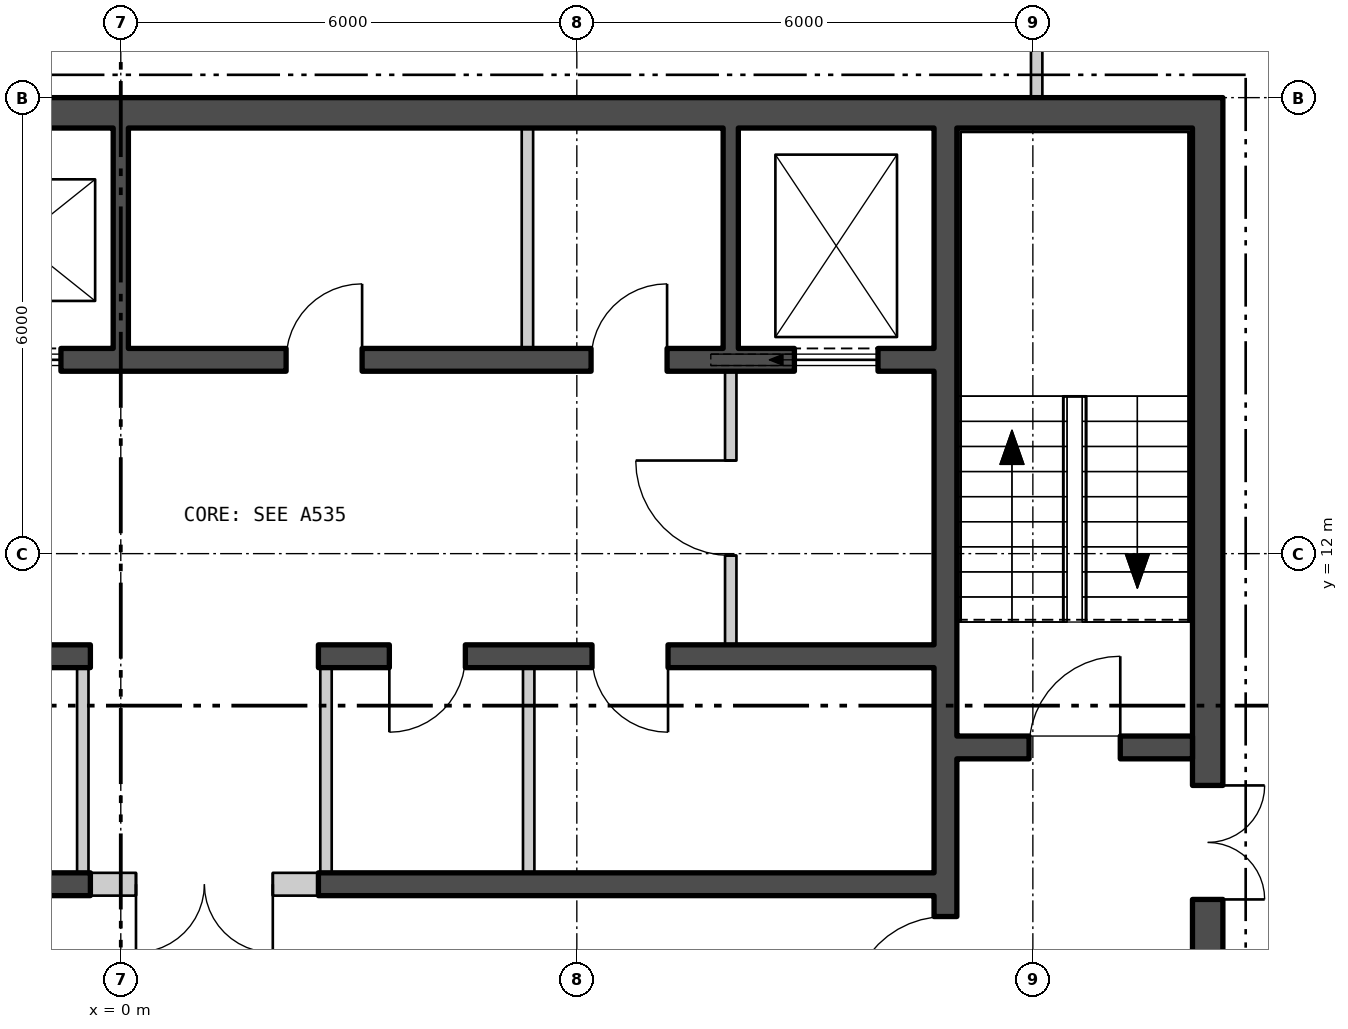
"""IFC4 building model, lengths in metres.
Left out: names, types, materials, properties, quantities, classifications, styles, units other than length and angle.
Written with IfcOpenShell. Run it as: python <this file> out.ifc"""

import sys

from ifc_helpers import new_model, si_unit, direction, frame, frame_2d, origin, place, context, subcontext, project, spatial, polyline, rectangle, outline, extrude, element, fill, save


model = new_model("IFC4")
c1 = context("Model", 3, precision=1e-05, world=origin(), true_north=direction((0.0, 1.0)))
c2 = subcontext(c1, "Body", "Model", "MODEL_VIEW")
j1 = project(units=[si_unit("LENGTHUNIT", "METRE"), si_unit("PLANEANGLEUNIT", "RADIAN")], contexts=[c1])
p1 = place(None, origin())
s1 = spatial("IfcSite", under=j1, at=p1, CompositionType="ELEMENT")
p2 = place(p1, origin())
s2 = spatial("IfcBuilding", under=s1, at=p2, CompositionType="ELEMENT")
p3 = place(p2, frame((0.0, 0.0, 298.2)))
s3 = spatial("IfcBuildingStorey", under=s2, at=p3, CompositionType="ELEMENT", Elevation=298.2)
p4 = place(p3, frame((2.335, -23.682, -0.28), z_axis=(0.0, 0.0, 1.0), x_axis=(0.499999764979, 0.866025539474, 0.0)))
e1 = element("IfcWall", 1, at=p4, inside=s3, PredefinedType="SOLIDWALL", context=c2, shape_type="SweptSolid", body=[
    extrude(outline(polyline([(-0.13, -0.225), (45.87, -0.225), (45.61, 0.225), (0.13, 0.225), (-0.13, -0.225)])), origin(), (0.0, 0.0, 1.0), 6.1),
])
p5 = place(p4, frame((1.424, 0.0, 1.18)))
e2 = element("IfcOpeningElement", 2, at=p5, cuts=e1, PredefinedType="OPENING", context=c2, shape_type="SweptSolid", body=[
    extrude(rectangle(XDim=2.4, YDim=4.1, at=frame_2d((1.2, 2.05))), frame((0.0, 0.235, 0.0), z_axis=(0.0, -1.0, 0.0), x_axis=(1.0, 0.0, 0.0)), (0.0, 0.0, 1.0), 0.47),
])
p6 = place(p4, frame((5.893, 0.0, 1.18)))
e3 = element("IfcOpeningElement", 3, at=p6, cuts=e1, PredefinedType="OPENING", context=c2, shape_type="SweptSolid", body=[
    extrude(rectangle(XDim=2.4, YDim=4.1, at=frame_2d((1.2, 2.05))), frame((0.0, 0.235, 0.0), z_axis=(0.0, -1.0, 0.0), x_axis=(1.0, 0.0, 0.0)), (0.0, 0.0, 1.0), 0.47),
])
p7 = place(p4, frame((10.401, 0.0, 1.18)))
e4 = element("IfcOpeningElement", 4, at=p7, cuts=e1, PredefinedType="OPENING", context=c2, shape_type="SweptSolid", body=[
    extrude(rectangle(XDim=2.4, YDim=4.1, at=frame_2d((1.2, 2.05))), frame((0.0, 0.235, 0.0), z_axis=(0.0, -1.0, 0.0), x_axis=(1.0, 0.0, 0.0)), (0.0, 0.0, 1.0), 0.47),
])
p8 = place(p4, frame((14.909, 0.0, 1.18)))
e5 = element("IfcOpeningElement", 5, at=p8, cuts=e1, PredefinedType="OPENING", context=c2, shape_type="SweptSolid", body=[
    extrude(rectangle(XDim=2.4, YDim=4.1, at=frame_2d((1.2, 2.05))), frame((0.0, 0.235, 0.0), z_axis=(0.0, -1.0, 0.0), x_axis=(1.0, 0.0, 0.0)), (0.0, 0.0, 1.0), 0.47),
])
p9 = place(p4, frame((19.716, 0.0, 0.28)))
e6 = element("IfcOpeningElement", 6, at=p9, cuts=e1, PredefinedType="OPENING", context=c2, shape_type="SweptSolid", body=[
    extrude(rectangle(XDim=1.8, YDim=2.4, at=frame_2d((0.9, 1.2))), frame((0.0, 0.235, 0.0), z_axis=(0.0, -1.0, 0.0), x_axis=(1.0, 0.0, 0.0)), (0.0, 0.0, 1.0), 0.47),
])
p10 = place(p4, frame((24.224, 0.0, 0.28)))
e7 = element("IfcOpeningElement", 7, at=p10, cuts=e1, PredefinedType="OPENING", context=c2, shape_type="SweptSolid", body=[
    extrude(rectangle(XDim=1.8, YDim=2.4, at=frame_2d((0.9, 1.2))), frame((0.0, 0.235, 0.0), z_axis=(0.0, -1.0, 0.0), x_axis=(1.0, 0.0, 0.0)), (0.0, 0.0, 1.0), 0.47),
])
p11 = place(p4, frame((28.431, 0.0, 1.18)))
e8 = element("IfcOpeningElement", 8, at=p11, cuts=e1, PredefinedType="OPENING", context=c2, shape_type="SweptSolid", body=[
    extrude(rectangle(XDim=2.4, YDim=4.1, at=frame_2d((1.2, 2.05))), frame((0.0, 0.235, 0.0), z_axis=(0.0, -1.0, 0.0), x_axis=(1.0, 0.0, 0.0)), (0.0, 0.0, 1.0), 0.47),
])
p12 = place(p4, frame((32.939, 0.0, 1.18)))
e9 = element("IfcOpeningElement", 9, at=p12, cuts=e1, PredefinedType="OPENING", context=c2, shape_type="SweptSolid", body=[
    extrude(rectangle(XDim=2.4, YDim=4.1, at=frame_2d((1.2, 2.05))), frame((0.0, 0.235, 0.0), z_axis=(0.0, -1.0, 0.0), x_axis=(1.0, 0.0, 0.0)), (0.0, 0.0, 1.0), 0.47),
])
p13 = place(p4, frame((37.447, 0.0, 1.18)))
e10 = element("IfcOpeningElement", 10, at=p13, cuts=e1, PredefinedType="OPENING", context=c2, shape_type="SweptSolid", body=[
    extrude(rectangle(XDim=2.4, YDim=4.1, at=frame_2d((1.2, 2.05))), frame((0.0, 0.235, 0.0), z_axis=(0.0, -1.0, 0.0), x_axis=(1.0, 0.0, 0.0)), (0.0, 0.0, 1.0), 0.47),
])
p14 = place(p4, frame((41.916, 0.0, 1.18)))
e11 = element("IfcOpeningElement", 11, at=p14, cuts=e1, PredefinedType="OPENING", context=c2, shape_type="SweptSolid", body=[
    extrude(rectangle(XDim=2.4, YDim=4.1, at=frame_2d((1.2, 2.05))), frame((0.0, 0.235, 0.0), z_axis=(0.0, -1.0, 0.0), x_axis=(1.0, 0.0, 0.0)), (0.0, 0.0, 1.0), 0.47),
])
p15 = place(p3, frame((-14.5, 17.8, 0.0), z_axis=(0.0, 0.0, 1.0), x_axis=(1.0, 0.0, 0.0)))
e12 = element("IfcWall", 12, at=p15, inside=s3, PredefinedType="SHEAR", context=c2, shape_type="SweptSolid", body=[
    extrude(rectangle(XDim=29.0, YDim=0.4, at=frame_2d((14.5, 0.0))), origin(), (0.0, 0.0, 1.0), 5.8),
])
p16 = place(p3, frame((14.3, 4.4, 0.0), z_axis=(0.0, 0.0, 1.0), x_axis=(0.0, 1.0, 0.0)))
e13 = element("IfcWall", 13, at=p16, inside=s3, PredefinedType="SHEAR", context=c2, shape_type="SweptSolid", body=[
    extrude(rectangle(XDim=13.2, YDim=0.4, at=frame_2d((6.6, 0.0))), origin(), (0.0, 0.0, 1.0), 5.8),
])
p17 = place(p16, frame((3.05, 0.0, 0.0)))
e14 = element("IfcOpeningElement", 14, at=p17, cuts=e13, PredefinedType="OPENING", context=c2, shape_type="SweptSolid", body=[
    extrude(rectangle(XDim=1.5, YDim=2.1, at=frame_2d((0.75, 1.05))), frame((0.0, 0.21, 0.0), z_axis=(0.0, -1.0, 0.0), x_axis=(1.0, 0.0, 0.0)), (0.0, 0.0, 1.0), 0.42),
])
p18 = place(p3, frame((10.85, 4.4, 0.0), z_axis=(0.0, 0.0, 1.0), x_axis=(0.0, 1.0, 0.0)))
e15 = element("IfcWall", 15, at=p18, inside=s3, PredefinedType="SHEAR", context=c2, shape_type="SweptSolid", body=[
    extrude(rectangle(XDim=13.2, YDim=0.3, at=frame_2d((6.6, 0.0))), origin(), (0.0, 0.0, 1.0), 5.8),
])
p19 = place(p18, frame((1.575, 0.0, 0.0)))
e16 = element("IfcOpeningElement", 16, at=p19, cuts=e15, PredefinedType="OPENING", context=c2, shape_type="SweptSolid", body=[
    extrude(rectangle(XDim=1.25, YDim=2.1, at=frame_2d((0.625, 1.05))), frame((0.0, 0.16, 0.0), z_axis=(0.0, -1.0, 0.0), x_axis=(1.0, 0.0, 0.0)), (0.0, 0.0, 1.0), 0.32),
])
p20 = place(p18, frame((0.4, 0.0, 0.0)))
e17 = element("IfcOpeningElement", 17, at=p20, cuts=e15, PredefinedType="OPENING", context=c2, shape_type="SweptSolid", body=[
    extrude(rectangle(XDim=0.9, YDim=2.1, at=frame_2d((0.45, 1.05))), frame((0.0, 0.16, 0.0), z_axis=(0.0, -1.0, 0.0), x_axis=(1.0, 0.0, 0.0)), (0.0, 0.0, 1.0), 0.32),
])
p21 = place(p3, frame((11.0, 9.45, 0.0), z_axis=(0.0, 0.0, 1.0), x_axis=(1.0, 0.0, 0.0)))
e18 = element("IfcWall", 18, at=p21, inside=s3, PredefinedType="SHEAR", context=c2, shape_type="SweptSolid", body=[
    extrude(rectangle(XDim=3.1, YDim=0.3, at=frame_2d((1.55, 0.0))), origin(), (0.0, 0.0, 1.0), 5.8),
])
p22 = place(p21, frame((0.95, 0.0, 0.0)))
e19 = element("IfcOpeningElement", 19, at=p22, cuts=e18, PredefinedType="OPENING", context=c2, shape_type="SweptSolid", body=[
    extrude(rectangle(XDim=1.2, YDim=2.1, at=frame_2d((0.6, 1.05))), frame((0.0, 0.16, 0.0), z_axis=(0.0, -1.0, 0.0), x_axis=(1.0, 0.0, 0.0)), (0.0, 0.0, 1.0), 0.32),
])
p23 = place(p3, frame((-10.7, 14.55, 0.0), z_axis=(0.0, 0.0, 1.0), x_axis=(1.0, 0.0, 0.0)))
e20 = element("IfcWall", 20, at=p23, inside=s3, PredefinedType="SHEAR", context=c2, shape_type="SweptSolid", body=[
    extrude(rectangle(XDim=21.4, YDim=0.3, at=frame_2d((10.7, 0.0))), origin(), (0.0, 0.0, 1.0), 5.8),
])
p24 = place(p23, frame((0.738, 0.0, 0.0)))
e21 = element("IfcOpeningElement", 21, at=p24, cuts=e20, PredefinedType="OPENING", context=c2, shape_type="SweptSolid", body=[
    extrude(rectangle(XDim=1.1, YDim=2.1, at=frame_2d((0.55, 1.05))), frame((0.0, 0.16, 0.0), z_axis=(0.0, -1.0, 0.0), x_axis=(1.0, 0.0, 0.0)), (0.0, 0.0, 1.0), 0.32),
])
p25 = place(p23, frame((3.462, 0.0, 0.0)))
e22 = element("IfcOpeningElement", 22, at=p25, cuts=e20, PredefinedType="OPENING", context=c2, shape_type="SweptSolid", body=[
    extrude(rectangle(XDim=1.1, YDim=2.1, at=frame_2d((0.55, 1.05))), frame((0.0, 0.16, 0.0), z_axis=(0.0, -1.0, 0.0), x_axis=(1.0, 0.0, 0.0)), (0.0, 0.0, 1.0), 0.32),
])
p26 = place(p23, frame((6.138, 0.0, 0.0)))
e23 = element("IfcOpeningElement", 23, at=p26, cuts=e20, PredefinedType="OPENING", context=c2, shape_type="SweptSolid", body=[
    extrude(rectangle(XDim=1.1, YDim=2.1, at=frame_2d((0.55, 1.05))), frame((0.0, 0.16, 0.0), z_axis=(0.0, -1.0, 0.0), x_axis=(1.0, 0.0, 0.0)), (0.0, 0.0, 1.0), 0.32),
])
p27 = place(p23, frame((8.812, 0.0, 0.0)))
e24 = element("IfcOpeningElement", 24, at=p27, cuts=e20, PredefinedType="OPENING", context=c2, shape_type="SweptSolid", body=[
    extrude(rectangle(XDim=1.1, YDim=2.1, at=frame_2d((0.55, 1.05))), frame((0.0, 0.16, 0.0), z_axis=(0.0, -1.0, 0.0), x_axis=(1.0, 0.0, 0.0)), (0.0, 0.0, 1.0), 0.32),
])
p28 = place(p23, frame((19.562, 0.0, 0.0)))
e25 = element("IfcOpeningElement", 25, at=p28, cuts=e20, PredefinedType="OPENING", context=c2, shape_type="SweptSolid", body=[
    extrude(rectangle(XDim=1.1, YDim=2.1, at=frame_2d((0.55, 1.05))), frame((0.0, 0.16, 0.0), z_axis=(0.0, -1.0, 0.0), x_axis=(1.0, 0.0, 0.0)), (0.0, 0.0, 1.0), 0.32),
])
p29 = place(p23, frame((12.875, 0.0, 0.0)))
e26 = element("IfcOpeningElement", 26, at=p29, cuts=e20, PredefinedType="OPENING", context=c2, shape_type="SweptSolid", body=[
    extrude(rectangle(XDim=1.0, YDim=2.1, at=frame_2d((0.5, 1.05))), frame((0.0, 0.16, 0.0), z_axis=(0.0, -1.0, 0.0), x_axis=(1.0, 0.0, 0.0)), (0.0, 0.0, 1.0), 0.32),
])
p30 = place(p23, frame((16.887, 0.0, 0.0)))
e27 = element("IfcOpeningElement", 27, at=p30, cuts=e20, PredefinedType="OPENING", context=c2, shape_type="SweptSolid", body=[
    extrude(rectangle(XDim=1.0, YDim=2.1, at=frame_2d((0.5, 1.05))), frame((0.0, 0.16, 0.0), z_axis=(0.0, -1.0, 0.0), x_axis=(1.0, 0.0, 0.0)), (0.0, 0.0, 1.0), 0.32),
])
p31 = place(p3, frame((-10.7, 10.65, 0.0), z_axis=(0.0, 0.0, 1.0), x_axis=(1.0, 0.0, 0.0)))
e28 = element("IfcWall", 28, at=p31, inside=s3, PredefinedType="SHEAR", context=c2, shape_type="SweptSolid", body=[
    extrude(rectangle(XDim=10.3, YDim=0.3, at=frame_2d((5.15, 0.0))), origin(), (0.0, 0.0, 1.0), 5.8),
])
p32 = place(p31, frame((0.675, 0.0, 0.0)))
e29 = element("IfcOpeningElement", 29, at=p32, cuts=e28, PredefinedType="OPENING", context=c2, shape_type="SweptSolid", body=[
    extrude(rectangle(XDim=1.1, YDim=2.1, at=frame_2d((0.55, 1.05))), frame((0.0, 0.16, 0.0), z_axis=(0.0, -1.0, 0.0), x_axis=(1.0, 0.0, 0.0)), (0.0, 0.0, 1.0), 0.32),
])
p33 = place(p31, frame((3.275, 0.0, 0.0)))
e30 = element("IfcOpeningElement", 30, at=p33, cuts=e28, PredefinedType="OPENING", context=c2, shape_type="SweptSolid", body=[
    extrude(rectangle(XDim=1.1, YDim=2.1, at=frame_2d((0.55, 1.05))), frame((0.0, 0.16, 0.0), z_axis=(0.0, -1.0, 0.0), x_axis=(1.0, 0.0, 0.0)), (0.0, 0.0, 1.0), 0.32),
])
p34 = place(p31, frame((5.825, 0.0, 0.0)))
e31 = element("IfcOpeningElement", 31, at=p34, cuts=e28, PredefinedType="OPENING", context=c2, shape_type="SweptSolid", body=[
    extrude(rectangle(XDim=1.1, YDim=2.1, at=frame_2d((0.55, 1.05))), frame((0.0, 0.16, 0.0), z_axis=(0.0, -1.0, 0.0), x_axis=(1.0, 0.0, 0.0)), (0.0, 0.0, 1.0), 0.32),
])
p35 = place(p31, frame((8.425, 0.0, 0.0)))
e32 = element("IfcOpeningElement", 32, at=p35, cuts=e28, PredefinedType="OPENING", context=c2, shape_type="SweptSolid", body=[
    extrude(rectangle(XDim=1.0, YDim=2.1, at=frame_2d((0.5, 1.05))), frame((0.0, 0.16, 0.0), z_axis=(0.0, -1.0, 0.0), x_axis=(1.0, 0.0, 0.0)), (0.0, 0.0, 1.0), 0.32),
])
p36 = place(p3, frame((-10.7, 7.65, 0.0), z_axis=(0.0, 0.0, 1.0), x_axis=(1.0, 0.0, 0.0)))
e33 = element("IfcWall", 33, at=p36, inside=s3, PredefinedType="SHEAR", context=c2, shape_type="SweptSolid", body=[
    extrude(rectangle(XDim=10.3, YDim=0.3, at=frame_2d((5.15, 0.0))), origin(), (0.0, 0.0, 1.0), 5.8),
])
p37 = place(p3, frame((2.6, 10.65, 0.0), z_axis=(0.0, 0.0, 1.0), x_axis=(1.0, 0.0, 0.0)))
e34 = element("IfcWall", 34, at=p37, inside=s3, PredefinedType="SHEAR", context=c2, shape_type="SweptSolid", body=[
    extrude(rectangle(XDim=8.1, YDim=0.3, at=frame_2d((4.05, 0.0))), origin(), (0.0, 0.0, 1.0), 5.8),
])
p38 = place(p37, frame((0.933, 0.0, 0.0)))
e35 = element("IfcOpeningElement", 35, at=p38, cuts=e34, PredefinedType="OPENING", context=c2, shape_type="SweptSolid", body=[
    extrude(rectangle(XDim=1.0, YDim=2.1, at=frame_2d((0.5, 1.05))), frame((0.0, 0.16, 0.0), z_axis=(0.0, -1.0, 0.0), x_axis=(1.0, 0.0, 0.0)), (0.0, 0.0, 1.0), 0.32),
])
p39 = place(p37, frame((3.6, 0.0, 0.0)))
e36 = element("IfcOpeningElement", 36, at=p39, cuts=e34, PredefinedType="OPENING", context=c2, shape_type="SweptSolid", body=[
    extrude(rectangle(XDim=1.0, YDim=2.1, at=frame_2d((0.5, 1.05))), frame((0.0, 0.16, 0.0), z_axis=(0.0, -1.0, 0.0), x_axis=(1.0, 0.0, 0.0)), (0.0, 0.0, 1.0), 0.32),
])
p40 = place(p3, frame((2.6, 7.65, 0.0), z_axis=(0.0, 0.0, 1.0), x_axis=(1.0, 0.0, 0.0)))
e37 = element("IfcWall", 37, at=p40, inside=s3, PredefinedType="SHEAR", context=c2, shape_type="SweptSolid", body=[
    extrude(rectangle(XDim=8.1, YDim=0.3, at=frame_2d((4.05, 0.0))), origin(), (0.0, 0.0, 1.0), 5.8),
])
p41 = place(p3, frame((0.0, 14.7, 0.0), z_axis=(0.0, 0.0, 1.0), x_axis=(0.0, 1.0, 0.0)))
e38 = element("IfcWall", 38, at=p41, inside=s3, PredefinedType="SHEAR", context=c2, shape_type="SweptSolid", body=[
    extrude(rectangle(XDim=2.9, YDim=0.2, at=frame_2d((1.45, 0.0))), origin(), (0.0, 0.0, 1.0), 5.8),
])
p42 = place(p3, frame((5.35, 14.7, 0.0), z_axis=(0.0, 0.0, 1.0), x_axis=(0.0, 1.0, 0.0)))
e39 = element("IfcWall", 39, at=p42, inside=s3, PredefinedType="PARTITIONING", context=c2, shape_type="SweptSolid", body=[
    extrude(rectangle(XDim=2.9, YDim=0.15, at=frame_2d((1.45, 0.0))), origin(), (0.0, 0.0, 1.0), 5.8),
])
p43 = place(p3, frame((8.025, 14.7, 0.0), z_axis=(0.0, 0.0, 1.0), x_axis=(0.0, 1.0, 0.0)))
e40 = element("IfcWall", 40, at=p43, inside=s3, PredefinedType="SHEAR", context=c2, shape_type="SweptSolid", body=[
    extrude(rectangle(XDim=2.9, YDim=0.2, at=frame_2d((1.45, 0.0))), origin(), (0.0, 0.0, 1.0), 5.8),
])
for number, where, z_axis, x_axis in (
    (41, (-0.5, 7.8, 0.0), (0.0, 0.0, 1.0), (0.0, 1.0, 0.0)),
    (42, (2.7, 7.8, 0.0), (0.0, 0.0, 1.0), (0.0, 1.0, 0.0)),
    (43, (5.367, 7.8, 0.0), (0.0, 0.0, 1.0), (0.0, 1.0, 0.0)),
):
    element("IfcWall", number, at=place(p3, frame(where, z_axis=z_axis, x_axis=x_axis)), inside=s3, PredefinedType="PARTITIONING", context=c2, shape_type="SweptSolid", body=[
        extrude(rectangle(XDim=2.7, YDim=0.15, at=frame_2d((1.35, 0.0))), origin(), (0.0, 0.0, 1.0), 5.8),
    ])
p44 = place(p3, frame((8.025, 10.8, 0.0), z_axis=(0.0, 0.0, 1.0), x_axis=(0.0, 1.0, 0.0)))
e44 = element("IfcWall", 44, at=p44, inside=s3, PredefinedType="PARTITIONING", context=c2, shape_type="SweptSolid", body=[
    extrude(rectangle(XDim=3.6, YDim=0.15, at=frame_2d((1.8, 0.0))), origin(), (0.0, 0.0, 1.0), 5.8),
])
p45 = place(p44, frame((1.175, 0.0, 0.0)))
e45 = element("IfcOpeningElement", 45, at=p45, cuts=e44, PredefinedType="OPENING", context=c2, shape_type="SweptSolid", body=[
    extrude(rectangle(XDim=1.25, YDim=2.1, at=frame_2d((0.625, 1.05))), frame((0.0, 0.085, 0.0), z_axis=(0.0, -1.0, 0.0), x_axis=(1.0, 0.0, 0.0)), (0.0, 0.0, 1.0), 0.17),
])
p46 = place(p3, frame((-0.4, 7.65, 0.0), z_axis=(0.0, 0.0, 1.0), x_axis=(1.0, 0.0, 0.0)))
e46 = element("IfcWall", 46, at=p46, inside=s3, PredefinedType="PARTITIONING", context=c2, shape_type="SweptSolid", body=[
    extrude(rectangle(XDim=3.0, YDim=0.3, at=frame_2d((1.5, 0.0))), origin(), (0.0, 0.0, 1.0), 5.8),
])
p47 = place(p46, frame((0.6, 0.0, 0.0)))
e47 = element("IfcOpeningElement", 47, at=p47, cuts=e46, PredefinedType="OPENING", context=c2, shape_type="SweptSolid", body=[
    extrude(rectangle(XDim=1.8, YDim=2.4, at=frame_2d((0.9, 1.2))), frame((0.0, 0.16, 0.0), z_axis=(0.0, -1.0, 0.0), x_axis=(1.0, 0.0, 0.0)), (0.0, 0.0, 1.0), 0.32),
])
p48 = place(p3, frame((12.05, 18.0, 0.0), z_axis=(0.0, 0.0, 1.0), x_axis=(0.0, 1.0, 0.0)))
e48 = element("IfcWall", 48, at=p48, inside=s3, PredefinedType="PARTITIONING", context=c2, shape_type="SweptSolid", body=[
    extrude(rectangle(XDim=1.75, YDim=0.15, at=frame_2d((0.875, 0.0))), origin(), (0.0, 0.0, 1.0), 5.8),
])
p49 = place(p27, origin())
e49 = element("IfcDoor", 49, at=p49, inside=s3, OperationType="SLIDING_TO_LEFT", PredefinedType="DOOR", context=c2, shape_type="SweptSolid", body=[
    extrude(rectangle(XDim=1.1, YDim=2.1, at=frame_2d((0.55, 1.05))), frame((0.0, 0.025, 0.0), z_axis=(0.0, -1.0, 0.0), x_axis=(1.0, 0.0, 0.0)), (0.0, 0.0, 1.0), 0.05),
])
fill(e24, e49)
p50 = place(p28, origin())
e50 = element("IfcDoor", 50, at=p50, inside=s3, OperationType="SLIDING_TO_LEFT", PredefinedType="DOOR", context=c2, shape_type="SweptSolid", body=[
    extrude(rectangle(XDim=1.1, YDim=2.1, at=frame_2d((0.55, 1.05))), frame((0.0, 0.025, 0.0), z_axis=(0.0, -1.0, 0.0), x_axis=(1.0, 0.0, 0.0)), (0.0, 0.0, 1.0), 0.05),
])
fill(e25, e50)
p51 = place(p29, origin())
e51 = element("IfcDoor", 51, at=p51, inside=s3, OperationType="SINGLE_SWING_LEFT", PredefinedType="DOOR", context=c2, shape_type="SweptSolid", body=[
    extrude(rectangle(XDim=1.0, YDim=2.1, at=frame_2d((0.5, 1.05))), frame((0.0, 0.025, 0.0), z_axis=(0.0, -1.0, 0.0), x_axis=(1.0, 0.0, 0.0)), (0.0, 0.0, 1.0), 0.05),
])
fill(e26, e51)
p52 = place(p30, origin())
e52 = element("IfcDoor", 52, at=p52, inside=s3, OperationType="SINGLE_SWING_LEFT", PredefinedType="DOOR", context=c2, shape_type="SweptSolid", body=[
    extrude(rectangle(XDim=1.0, YDim=2.1, at=frame_2d((0.5, 1.05))), frame((0.0, 0.025, 0.0), z_axis=(0.0, -1.0, 0.0), x_axis=(1.0, 0.0, 0.0)), (0.0, 0.0, 1.0), 0.05),
])
fill(e27, e52)
p53 = place(p38, origin())
e53 = element("IfcDoor", 53, at=p53, inside=s3, OperationType="SINGLE_SWING_LEFT", PredefinedType="DOOR", context=c2, shape_type="SweptSolid", body=[
    extrude(rectangle(XDim=1.0, YDim=2.1, at=frame_2d((0.5, 1.05))), frame((0.0, 0.025, 0.0), z_axis=(0.0, -1.0, 0.0), x_axis=(1.0, 0.0, 0.0)), (0.0, 0.0, 1.0), 0.05),
])
fill(e35, e53)
p54 = place(p39, origin())
e54 = element("IfcDoor", 54, at=p54, inside=s3, OperationType="SINGLE_SWING_RIGHT", PredefinedType="DOOR", context=c2, shape_type="SweptSolid", body=[
    extrude(rectangle(XDim=1.0, YDim=2.1, at=frame_2d((0.5, 1.05))), frame((0.0, 0.025, 0.0), z_axis=(0.0, -1.0, 0.0), x_axis=(1.0, 0.0, 0.0)), (0.0, 0.0, 1.0), 0.05),
])
fill(e36, e54)
p55 = place(p45, origin())
e55 = element("IfcDoor", 55, at=p55, inside=s3, OperationType="SINGLE_SWING_LEFT", PredefinedType="DOOR", context=c2, shape_type="SweptSolid", body=[
    extrude(rectangle(XDim=1.25, YDim=2.1, at=frame_2d((0.625, 1.05))), frame((0.0, 0.025, 0.0), z_axis=(0.0, -1.0, 0.0), x_axis=(1.0, 0.0, 0.0)), (0.0, 0.0, 1.0), 0.05),
])
fill(e45, e55)
p56 = place(p22, origin())
e56 = element("IfcDoor", 56, at=p56, inside=s3, OperationType="SINGLE_SWING_LEFT", PredefinedType="DOOR", context=c2, shape_type="SweptSolid", body=[
    extrude(rectangle(XDim=1.2, YDim=2.1, at=frame_2d((0.6, 1.05))), frame((0.0, 0.025, 0.0), z_axis=(0.0, -1.0, 0.0), x_axis=(1.0, 0.0, 0.0)), (0.0, 0.0, 1.0), 0.05),
])
fill(e19, e56)
p57 = place(p19, origin())
e57 = element("IfcDoor", 57, at=p57, inside=s3, OperationType="SINGLE_SWING_RIGHT", PredefinedType="DOOR", context=c2, shape_type="SweptSolid", body=[
    extrude(rectangle(XDim=1.25, YDim=2.1, at=frame_2d((0.625, 1.05))), frame((0.0, 0.025, 0.0), z_axis=(0.0, -1.0, 0.0), x_axis=(1.0, 0.0, 0.0)), (0.0, 0.0, 1.0), 0.05),
])
fill(e16, e57)
p58 = place(p17, origin())
e58 = element("IfcDoor", 58, at=p58, inside=s3, OperationType="DOUBLE_DOOR_SINGLE_SWING", PredefinedType="DOOR", context=c2, shape_type="SweptSolid", body=[
    extrude(rectangle(XDim=1.5, YDim=2.1, at=frame_2d((0.75, 1.05))), frame((0.0, 0.025, 0.0), z_axis=(0.0, -1.0, 0.0), x_axis=(1.0, 0.0, 0.0)), (0.0, 0.0, 1.0), 0.05),
])
fill(e14, e58)
p59 = place(p47, origin())
e59 = element("IfcDoor", 59, at=p59, inside=s3, OperationType="DOUBLE_DOOR_SINGLE_SWING", PredefinedType="DOOR", context=c2, shape_type="SweptSolid", body=[
    extrude(rectangle(XDim=1.8, YDim=2.4, at=frame_2d((0.9, 1.2))), frame((0.0, 0.025, 0.0), z_axis=(0.0, -1.0, 0.0), x_axis=(1.0, 0.0, 0.0)), (0.0, 0.0, 1.0), 0.05),
])
fill(e47, e59)
save(model, sys.argv[1])
